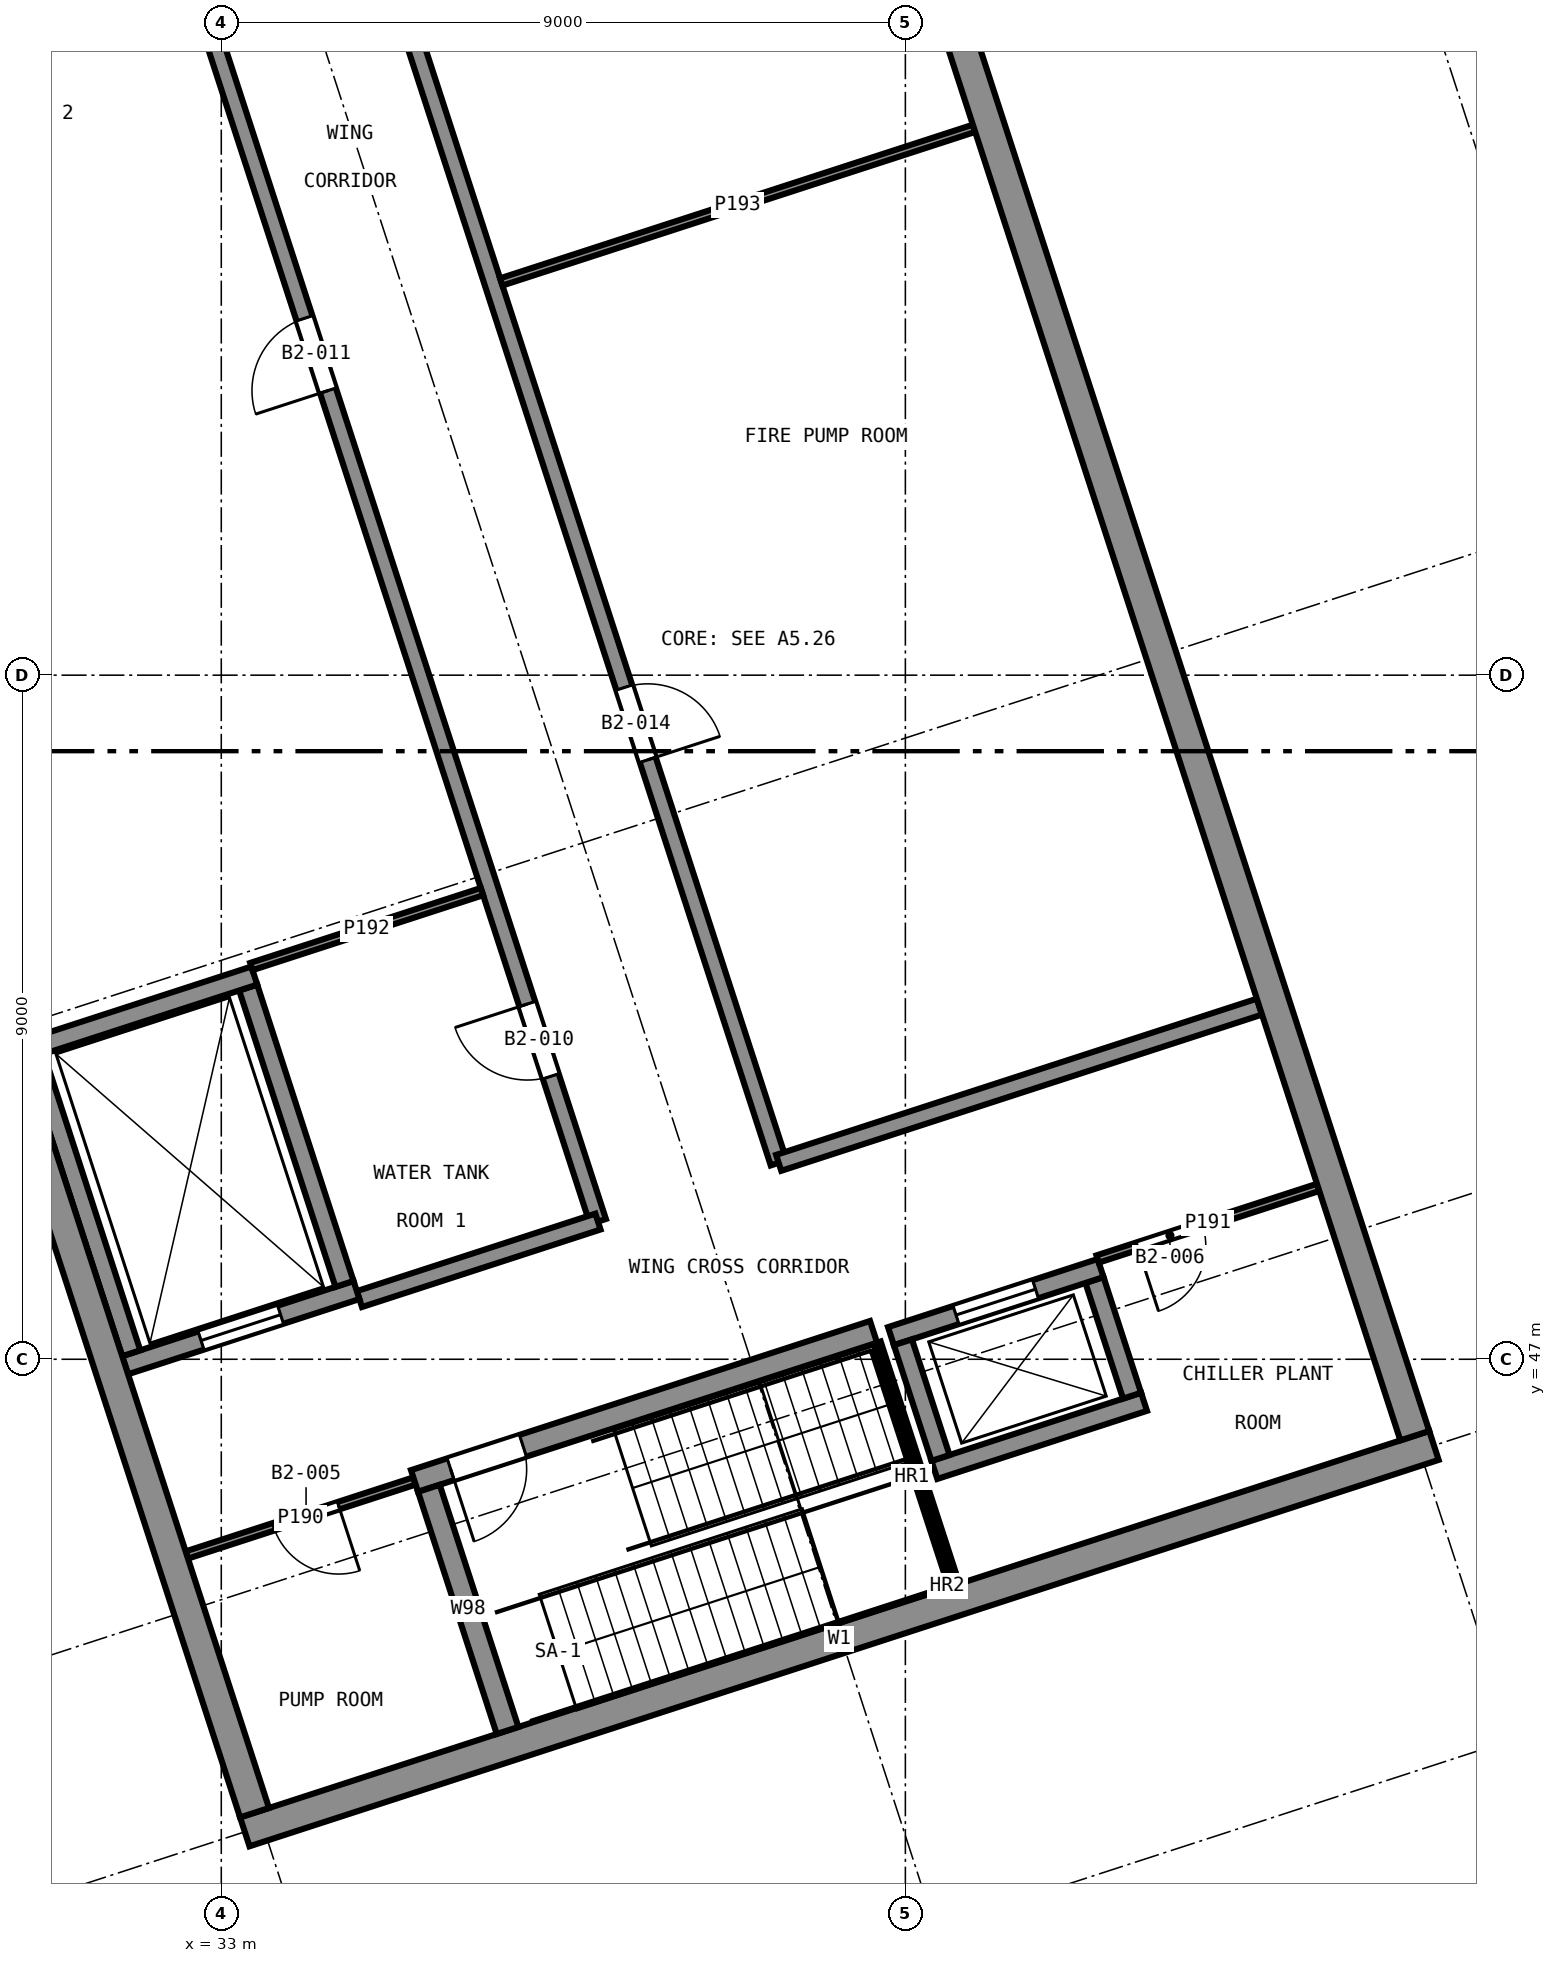
"""IFC4 building model, lengths in metres.
Left out: names, types, materials, properties, quantities, classifications, styles, units other than length and angle.
Written with IfcOpenShell. Run it as: python <this file> out.ifc"""

import sys

from ifc_helpers import new_model, si_unit, direction, frame, frame_2d, origin, place, context, subcontext, project, spatial, rectangle, extrude, element, fill, save


model = new_model("IFC4")
c1 = context("Model", 3, precision=1e-05, world=origin(), true_north=direction((0.0, 1.0)))
c2 = subcontext(c1, "Body", "Model", "MODEL_VIEW")
j1 = project(units=[si_unit("LENGTHUNIT", "METRE"), si_unit("PLANEANGLEUNIT", "RADIAN")], contexts=[c1])
p1 = place(None, origin())
s1 = spatial("IfcSite", under=j1, at=p1, CompositionType="ELEMENT")
p2 = place(p1, origin())
s2 = spatial("IfcBuilding", under=s1, at=p2, CompositionType="ELEMENT")
p3 = place(p2, frame((0.0, 0.0, -10.0)))
s3 = spatial("IfcBuildingStorey", under=s2, at=p3, CompositionType="ELEMENT", Elevation=-10.0)
p4 = place(p3, frame((33.309, 40.783, 0.0), z_axis=(0.0, 0.0, 1.0), x_axis=(0.951057297292, 0.309014590704, 0.0)))
e1 = element("IfcWall", 1, at=p4, inside=s3, PredefinedType="SOLIDWALL", context=c2, shape_type="SweptSolid", body=[
    extrude(rectangle(XDim=16.45, YDim=0.4, at=frame_2d((8.225, 0.0))), origin(), (0.0, 0.0, 1.0), 5.0),
])
p5 = place(p3, frame((48.702, 45.994, 0.0), z_axis=(0.0, 0.0, 1.0), x_axis=(-0.309016036191, 0.951056827627, 0.0)))
e2 = element("IfcWall", 2, at=p5, inside=s3, PredefinedType="SOLIDWALL", context=c2, shape_type="SweptSolid", body=[
    extrude(rectangle(XDim=53.6, YDim=0.4, at=frame_2d((26.8, 0.0))), origin(), (0.0, 0.0, 1.0), 5.0),
])
p6 = place(p5, frame((31.9, 0.0, 0.0)))
e3 = element("IfcOpeningElement", 3, at=p6, cuts=e2, PredefinedType="OPENING", context=c2, shape_type="SweptSolid", body=[
    extrude(rectangle(XDim=1.2, YDim=2.1, at=frame_2d((0.6, 1.05))), frame((0.0, 0.21, 0.0), z_axis=(0.0, -1.0, 0.0), x_axis=(1.0, 0.0, 0.0)), (0.0, 0.0, 1.0), 0.42),
])
p7 = place(p3, frame((16.874, 92.011, 0.0), z_axis=(0.0, 0.0, 1.0), x_axis=(0.309020156104, -0.951055488981, 0.0)))
e4 = element("IfcWall", 4, at=p7, inside=s3, PredefinedType="SOLIDWALL", context=c2, shape_type="SweptSolid", body=[
    extrude(rectangle(XDim=53.6, YDim=0.4, at=frame_2d((26.8, 0.0))), origin(), (0.0, 0.0, 1.0), 5.0),
])
p8 = place(p3, frame((41.581, 47.361, 0.0), z_axis=(0.0, 0.0, 1.0), x_axis=(-0.951058929949, -0.309009565815, 0.0)))
e5 = element("IfcWall", 5, at=p8, inside=s3, PredefinedType="SOLIDWALL", context=c2, shape_type="SweptSolid", body=[
    extrude(rectangle(XDim=6.35, YDim=0.3, at=frame_2d((3.175, 0.0))), origin(), (0.0, 0.0, 1.0), 4.65),
])
p9 = place(p8, frame((4.85, 0.0, 0.0)))
e6 = element("IfcOpeningElement", 6, at=p9, cuts=e5, PredefinedType="OPENING", context=c2, shape_type="SweptSolid", body=[
    extrude(rectangle(XDim=1.0, YDim=2.1, at=frame_2d((0.5, 1.05))), frame((0.0, 0.16, 0.0), z_axis=(0.0, -1.0, 0.0), x_axis=(1.0, 0.0, 0.0)), (0.0, 0.0, 1.0), 0.32),
])
p10 = place(p3, frame((35.731, 45.302, 0.0), z_axis=(0.0, 0.0, 1.0), x_axis=(0.309003676349, -0.951060843481, 0.0)))
e7 = element("IfcWall", 7, at=p10, inside=s3, PredefinedType="SOLIDWALL", context=c2, shape_type="SweptSolid", body=[
    extrude(rectangle(XDim=3.35, YDim=0.3, at=frame_2d((1.675, 0.0))), origin(), (0.0, 0.0, 1.0), 4.65),
])
p11 = place(p3, frame((42.382, 45.544, -1.5), z_axis=(0.0, 0.0, 1.0), x_axis=(0.951071801089, 0.308969948659, 0.0)))
e8 = element("IfcWall", 8, at=p11, inside=s3, PredefinedType="SHEAR", context=c2, shape_type="SweptSolid", body=[
    extrude(rectangle(XDim=2.9, YDim=0.25, at=frame_2d((1.45, 0.0))), origin(), (0.0, 0.0, 1.0), 6.5),
])
p12 = place(p3, frame((44.982, 46.521, -1.5), z_axis=(0.0, 0.0, 1.0), x_axis=(-0.308986014439, 0.951066581729, 0.0)))
e9 = element("IfcWall", 9, at=p12, inside=s3, PredefinedType="SHEAR", context=c2, shape_type="SweptSolid", body=[
    extrude(rectangle(XDim=1.6, YDim=0.25, at=frame_2d((0.8, 0.0))), origin(), (0.0, 0.0, 1.0), 6.5),
])
p13 = place(p3, frame((44.568, 48.2, -1.5), z_axis=(0.0, 0.0, 1.0), x_axis=(-0.951047059821, -0.309046096893, 0.0)))
e10 = element("IfcWall", 10, at=p13, inside=s3, PredefinedType="SHEAR", context=c2, shape_type="SweptSolid", body=[
    extrude(rectangle(XDim=2.9, YDim=0.25, at=frame_2d((1.45, 0.0))), origin(), (0.0, 0.0, 1.0), 6.5),
])
p14 = place(p13, frame((0.9, 0.0, 1.5)))
e11 = element("IfcOpeningElement", 11, at=p14, cuts=e10, PredefinedType="OPENING", context=c2, shape_type="SweptSolid", body=[
    extrude(rectangle(XDim=1.1, YDim=2.1, at=frame_2d((0.55, 1.05))), frame((0.0, 0.135, 0.0), z_axis=(0.0, -1.0, 0.0), x_axis=(1.0, 0.0, 0.0)), (0.0, 0.0, 1.0), 0.27),
])
p15 = place(p3, frame((41.968, 47.224, -1.5), z_axis=(0.0, 0.0, 1.0), x_axis=(0.308986014439, -0.951066581729, 0.0)))
e12 = element("IfcWall", 12, at=p15, inside=s3, PredefinedType="SHEAR", context=c2, shape_type="SweptSolid", body=[
    extrude(rectangle(XDim=1.6, YDim=0.25, at=frame_2d((0.8, 0.0))), origin(), (0.0, 0.0, 1.0), 6.5),
])
p16 = place(p3, frame((31.735, 46.922, -1.5), z_axis=(0.0, 0.0, 1.0), x_axis=(0.95104415986, 0.309055020985, 0.0)))
e13 = element("IfcWall", 13, at=p16, inside=s3, PredefinedType="SHEAR", context=c2, shape_type="SweptSolid", body=[
    extrude(rectangle(XDim=3.2, YDim=0.25, at=frame_2d((1.6, 0.0))), origin(), (0.0, 0.0, 1.0), 6.5),
])
p17 = place(p16, frame((1.05, 0.0, 1.5)))
e14 = element("IfcOpeningElement", 14, at=p17, cuts=e13, PredefinedType="OPENING", context=c2, shape_type="SweptSolid", body=[
    extrude(rectangle(XDim=1.1, YDim=2.1, at=frame_2d((0.55, 1.05))), frame((0.0, 0.135, 0.0), z_axis=(0.0, -1.0, 0.0), x_axis=(1.0, 0.0, 0.0)), (0.0, 0.0, 1.0), 0.27),
])
p18 = place(p3, frame((34.621, 47.991, -1.5), z_axis=(0.0, 0.0, 1.0), x_axis=(-0.309055103076, 0.951044133184, 0.0)))
e15 = element("IfcWall", 15, at=p18, inside=s3, PredefinedType="SHEAR", context=c2, shape_type="SweptSolid", body=[
    extrude(rectangle(XDim=4.1, YDim=0.25, at=frame_2d((2.05, 0.0))), origin(), (0.0, 0.0, 1.0), 6.5),
])
p19 = place(p3, frame((33.434, 52.048, -1.5), z_axis=(0.0, 0.0, 1.0), x_axis=(-0.951066581729, -0.308986014439, 0.0)))
e16 = element("IfcWall", 16, at=p19, inside=s3, PredefinedType="SHEAR", context=c2, shape_type="SweptSolid", body=[
    extrude(rectangle(XDim=3.2, YDim=0.25, at=frame_2d((1.6, 0.0))), origin(), (0.0, 0.0, 1.0), 6.5),
])
p20 = place(p3, frame((30.548, 50.979, -1.5), z_axis=(0.0, 0.0, 1.0), x_axis=(0.309055103076, -0.951044133184, 0.0)))
e17 = element("IfcWall", 17, at=p20, inside=s3, PredefinedType="SHEAR", context=c2, shape_type="SweptSolid", body=[
    extrude(rectangle(XDim=4.1, YDim=0.25, at=frame_2d((2.05, 0.0))), origin(), (0.0, 0.0, 1.0), 6.5),
])
p21 = place(p3, frame((37.956, 48.812, 0.0), z_axis=(0.0, 0.0, 1.0), x_axis=(-0.30901736393, 0.951056396219, 0.0)))
e18 = element("IfcWall", 18, at=p21, inside=s3, PredefinedType="SOLIDWALL", context=c2, shape_type="SweptSolid", body=[
    extrude(rectangle(XDim=41.7, YDim=0.22, at=frame_2d((20.85, 0.0))), origin(), (0.0, 0.0, 1.0), 4.65),
])
p22 = place(p21, frame((2.009, 0.0, 0.0)))
e19 = element("IfcOpeningElement", 19, at=p22, cuts=e18, PredefinedType="OPENING", context=c2, shape_type="SweptSolid", body=[
    extrude(rectangle(XDim=1.0, YDim=2.1, at=frame_2d((0.5, 1.05))), frame((0.0, 0.12, 0.0), z_axis=(0.0, -1.0, 0.0), x_axis=(1.0, 0.0, 0.0)), (0.0, 0.0, 1.0), 0.24),
])
p23 = place(p21, frame((11.495, 0.0, 0.0)))
e20 = element("IfcOpeningElement", 20, at=p23, cuts=e18, PredefinedType="OPENING", context=c2, shape_type="SweptSolid", body=[
    extrude(rectangle(XDim=1.0, YDim=2.1, at=frame_2d((0.5, 1.05))), frame((0.0, 0.12, 0.0), z_axis=(0.0, -1.0, 0.0), x_axis=(1.0, 0.0, 0.0)), (0.0, 0.0, 1.0), 0.24),
])
p24 = place(p21, frame((24.3, 0.0, 0.0)))
e21 = element("IfcOpeningElement", 21, at=p24, cuts=e18, PredefinedType="OPENING", context=c2, shape_type="SweptSolid", body=[
    extrude(rectangle(XDim=1.0, YDim=2.1, at=frame_2d((0.5, 1.05))), frame((0.0, 0.12, 0.0), z_axis=(0.0, -1.0, 0.0), x_axis=(1.0, 0.0, 0.0)), (0.0, 0.0, 1.0), 0.24),
])
p25 = place(p21, frame((35.045, 0.0, 0.0)))
e22 = element("IfcOpeningElement", 22, at=p25, cuts=e18, PredefinedType="OPENING", context=c2, shape_type="SweptSolid", body=[
    extrude(rectangle(XDim=1.0, YDim=2.1, at=frame_2d((0.5, 1.05))), frame((0.0, 0.12, 0.0), z_axis=(0.0, -1.0, 0.0), x_axis=(1.0, 0.0, 0.0)), (0.0, 0.0, 1.0), 0.24),
])
p26 = place(p3, frame((40.333, 49.584, 0.0), z_axis=(0.0, 0.0, 1.0), x_axis=(-0.309015643281, 0.951056955291, 0.0)))
e23 = element("IfcWall", 23, at=p26, inside=s3, PredefinedType="SOLIDWALL", context=c2, shape_type="SweptSolid", body=[
    extrude(rectangle(XDim=41.7, YDim=0.22, at=frame_2d((20.85, 0.0))), origin(), (0.0, 0.0, 1.0), 4.65),
])
p27 = place(p26, frame((5.575, 0.0, 0.0)))
e24 = element("IfcOpeningElement", 24, at=p27, cuts=e23, PredefinedType="OPENING", context=c2, shape_type="SweptSolid", body=[
    extrude(rectangle(XDim=1.0, YDim=2.1, at=frame_2d((0.5, 1.05))), frame((0.0, 0.12, 0.0), z_axis=(0.0, -1.0, 0.0), x_axis=(1.0, 0.0, 0.0)), (0.0, 0.0, 1.0), 0.24),
])
p28 = place(p26, frame((16.475, 0.0, 0.0)))
e25 = element("IfcOpeningElement", 25, at=p28, cuts=e23, PredefinedType="OPENING", context=c2, shape_type="SweptSolid", body=[
    extrude(rectangle(XDim=1.0, YDim=2.1, at=frame_2d((0.5, 1.05))), frame((0.0, 0.12, 0.0), z_axis=(0.0, -1.0, 0.0), x_axis=(1.0, 0.0, 0.0)), (0.0, 0.0, 1.0), 0.24),
])
p29 = place(p26, frame((25.752, 0.0, 0.0)))
e26 = element("IfcOpeningElement", 26, at=p29, cuts=e23, PredefinedType="OPENING", context=c2, shape_type="SweptSolid", body=[
    extrude(rectangle(XDim=1.0, YDim=2.1, at=frame_2d((0.5, 1.05))), frame((0.0, 0.12, 0.0), z_axis=(0.0, -1.0, 0.0), x_axis=(1.0, 0.0, 0.0)), (0.0, 0.0, 1.0), 0.24),
])
p30 = place(p26, frame((35.5, 0.0, 0.0)))
e27 = element("IfcOpeningElement", 27, at=p30, cuts=e23, PredefinedType="OPENING", context=c2, shape_type="SweptSolid", body=[
    extrude(rectangle(XDim=1.0, YDim=2.1, at=frame_2d((0.5, 1.05))), frame((0.0, 0.12, 0.0), z_axis=(0.0, -1.0, 0.0), x_axis=(1.0, 0.0, 0.0)), (0.0, 0.0, 1.0), 0.24),
])
p31 = place(p3, frame((34.817, 47.792, 0.0), z_axis=(0.0, 0.0, 1.0), x_axis=(0.951053095941, 0.309027520945, 0.0)))
e28 = element("IfcWall", 28, at=p31, inside=s3, PredefinedType="SOLIDWALL", context=c2, shape_type="SweptSolid", body=[
    extrude(rectangle(XDim=3.3, YDim=0.22, at=frame_2d((1.65, 0.0))), origin(), (0.0, 0.0, 1.0), 4.65),
])
p32 = place(p3, frame((40.333, 49.584, 0.0), z_axis=(0.0, 0.0, 1.0), x_axis=(0.95105699893, 0.309015508975, 0.0)))
e29 = element("IfcWall", 29, at=p32, inside=s3, PredefinedType="SOLIDWALL", context=c2, shape_type="SweptSolid", body=[
    extrude(rectangle(XDim=6.65, YDim=0.22, at=frame_2d((3.325, 0.0))), origin(), (0.0, 0.0, 1.0), 4.65),
])
p33 = place(p3, frame((32.546, 44.425, 0.0), z_axis=(0.0, 0.0, 1.0), x_axis=(0.951058557014, 0.309010713619, 0.0)))
e30 = element("IfcWall", 30, at=p33, inside=s3, PredefinedType="PARTITIONING", context=c2, shape_type="SweptSolid", body=[
    extrude(rectangle(XDim=3.15, YDim=0.1, at=frame_2d((1.575, 0.0))), origin(), (0.0, 0.0, 1.0), 4.65),
])
p34 = place(p33, frame((1.2, 0.0, 0.0)))
e31 = element("IfcOpeningElement", 31, at=p34, cuts=e30, PredefinedType="OPENING", context=c2, shape_type="SweptSolid", body=[
    extrude(rectangle(XDim=0.9, YDim=2.1, at=frame_2d((0.45, 1.05))), frame((0.0, 0.06, 0.0), z_axis=(0.0, -1.0, 0.0), x_axis=(1.0, 0.0, 0.0)), (0.0, 0.0, 1.0), 0.12),
])
p35 = place(p3, frame((44.53, 48.319, 0.0), z_axis=(0.0, 0.0, 1.0), x_axis=(0.951072883748, 0.308966615996, 0.0)))
e32 = element("IfcWall", 32, at=p35, inside=s3, PredefinedType="PARTITIONING", context=c2, shape_type="SweptSolid", body=[
    extrude(rectangle(XDim=3.05, YDim=0.1, at=frame_2d((1.525, 0.0))), origin(), (0.0, 0.0, 1.0), 4.65),
])
p36 = place(p35, frame((0.55, 0.0, 0.0)))
e33 = element("IfcOpeningElement", 33, at=p36, cuts=e32, PredefinedType="OPENING", context=c2, shape_type="SweptSolid", body=[
    extrude(rectangle(XDim=0.9, YDim=2.1, at=frame_2d((0.45, 1.05))), frame((0.0, 0.06, 0.0), z_axis=(0.0, -1.0, 0.0), x_axis=(1.0, 0.0, 0.0)), (0.0, 0.0, 1.0), 0.12),
])
p37 = place(p3, frame((33.396, 52.167, 0.0), z_axis=(0.0, 0.0, 1.0), x_axis=(0.951044192343, 0.309054921027, 0.0)))
e34 = element("IfcWall", 34, at=p37, inside=s3, PredefinedType="PARTITIONING", context=c2, shape_type="SweptSolid", body=[
    extrude(rectangle(XDim=3.19, YDim=0.1, at=frame_2d((1.595, 0.0))), origin(), (0.0, 0.0, 1.0), 4.65),
])
p38 = place(p3, frame((36.683, 61.173, 0.0), z_axis=(0.0, 0.0, 1.0), x_axis=(0.951056287011, 0.309017700038, 0.0)))
e35 = element("IfcWall", 35, at=p38, inside=s3, PredefinedType="PARTITIONING", context=c2, shape_type="SweptSolid", body=[
    extrude(rectangle(XDim=6.54, YDim=0.1, at=frame_2d((3.27, 0.0))), origin(), (0.0, 0.0, 1.0), 4.65),
])
p39 = place(p3, frame((42.663, 44.032, 0.0), z_axis=(0.0, 0.0, 1.0), x_axis=(-0.309003676349, 0.951060843481, 0.0)))
e36 = element("IfcWall", 36, at=p39, inside=s3, PredefinedType="PARTITIONING", context=c2, shape_type="SweptSolid", body=[
    extrude(rectangle(XDim=3.35, YDim=0.1, at=frame_2d((1.675, 0.0))), origin(), (0.0, 0.0, 1.0), 4.65),
])
p40 = place(p14, origin())
e37 = element("IfcDoor", 37, at=p40, inside=s3, OperationType="SLIDING_TO_LEFT", PredefinedType="DOOR", context=c2, shape_type="SweptSolid", body=[
    extrude(rectangle(XDim=1.1, YDim=2.1, at=frame_2d((0.55, 1.05))), frame((0.0, 0.025, 0.0), z_axis=(0.0, -1.0, 0.0), x_axis=(1.0, 0.0, 0.0)), (0.0, 0.0, 1.0), 0.05),
])
fill(e11, e37)
p41 = place(p17, origin())
e38 = element("IfcDoor", 38, at=p41, inside=s3, OperationType="SLIDING_TO_LEFT", PredefinedType="DOOR", context=c2, shape_type="SweptSolid", body=[
    extrude(rectangle(XDim=1.1, YDim=2.1, at=frame_2d((0.55, 1.05))), frame((0.0, 0.025, 0.0), z_axis=(0.0, -1.0, 0.0), x_axis=(1.0, 0.0, 0.0)), (0.0, 0.0, 1.0), 0.05),
])
fill(e14, e38)
p42 = place(p34, frame((0.9, 0.0, 0.0), z_axis=(0.0, 0.0, 1.0), x_axis=(-1.0, 0.0, 0.0)))
e39 = element("IfcDoor", 39, at=p42, inside=s3, OperationType="SINGLE_SWING_RIGHT", PredefinedType="DOOR", context=c2, shape_type="SweptSolid", body=[
    extrude(rectangle(XDim=0.9, YDim=2.1, at=frame_2d((0.45, 1.05))), frame((0.0, 0.025, 0.0), z_axis=(0.0, -1.0, 0.0), x_axis=(1.0, 0.0, 0.0)), (0.0, 0.0, 1.0), 0.05),
])
fill(e31, e39)
p43 = place(p36, frame((0.9, 0.0, 0.0), z_axis=(0.0, 0.0, 1.0), x_axis=(-1.0, 0.0, 0.0)))
e40 = element("IfcDoor", 40, at=p43, inside=s3, OperationType="SINGLE_SWING_LEFT", PredefinedType="DOOR", context=c2, shape_type="SweptSolid", body=[
    extrude(rectangle(XDim=0.9, YDim=2.1, at=frame_2d((0.45, 1.05))), frame((0.0, 0.025, 0.0), z_axis=(0.0, -1.0, 0.0), x_axis=(1.0, 0.0, 0.0)), (0.0, 0.0, 1.0), 0.05),
])
fill(e33, e40)
p44 = place(p22, origin())
e41 = element("IfcDoor", 41, at=p44, inside=s3, OperationType="SINGLE_SWING_LEFT", PredefinedType="DOOR", context=c2, shape_type="SweptSolid", body=[
    extrude(rectangle(XDim=1.0, YDim=2.1, at=frame_2d((0.5, 1.05))), frame((0.0, 0.025, 0.0), z_axis=(0.0, -1.0, 0.0), x_axis=(1.0, 0.0, 0.0)), (0.0, 0.0, 1.0), 0.05),
])
fill(e19, e41)
p45 = place(p23, origin())
e42 = element("IfcDoor", 42, at=p45, inside=s3, OperationType="SINGLE_SWING_RIGHT", PredefinedType="DOOR", context=c2, shape_type="SweptSolid", body=[
    extrude(rectangle(XDim=1.0, YDim=2.1, at=frame_2d((0.5, 1.05))), frame((0.0, 0.025, 0.0), z_axis=(0.0, -1.0, 0.0), x_axis=(1.0, 0.0, 0.0)), (0.0, 0.0, 1.0), 0.05),
])
fill(e20, e42)
p46 = place(p27, frame((1.0, 0.0, 0.0), z_axis=(0.0, 0.0, 1.0), x_axis=(-1.0, 0.0, 0.0)))
e43 = element("IfcDoor", 43, at=p46, inside=s3, OperationType="SINGLE_SWING_LEFT", PredefinedType="DOOR", context=c2, shape_type="SweptSolid", body=[
    extrude(rectangle(XDim=1.0, YDim=2.1, at=frame_2d((0.5, 1.05))), frame((0.0, 0.025, 0.0), z_axis=(0.0, -1.0, 0.0), x_axis=(1.0, 0.0, 0.0)), (0.0, 0.0, 1.0), 0.05),
])
fill(e24, e43)
p47 = place(p9, origin())
e44 = element("IfcDoor", 44, at=p47, inside=s3, OperationType="SINGLE_SWING_LEFT", PredefinedType="DOOR", context=c2, shape_type="SweptSolid", body=[
    extrude(rectangle(XDim=1.0, YDim=2.1, at=frame_2d((0.5, 1.05))), frame((0.0, 0.025, 0.0), z_axis=(0.0, -1.0, 0.0), x_axis=(1.0, 0.0, 0.0)), (0.0, 0.0, 1.0), 0.05),
])
fill(e6, e44)
save(model, sys.argv[1])
